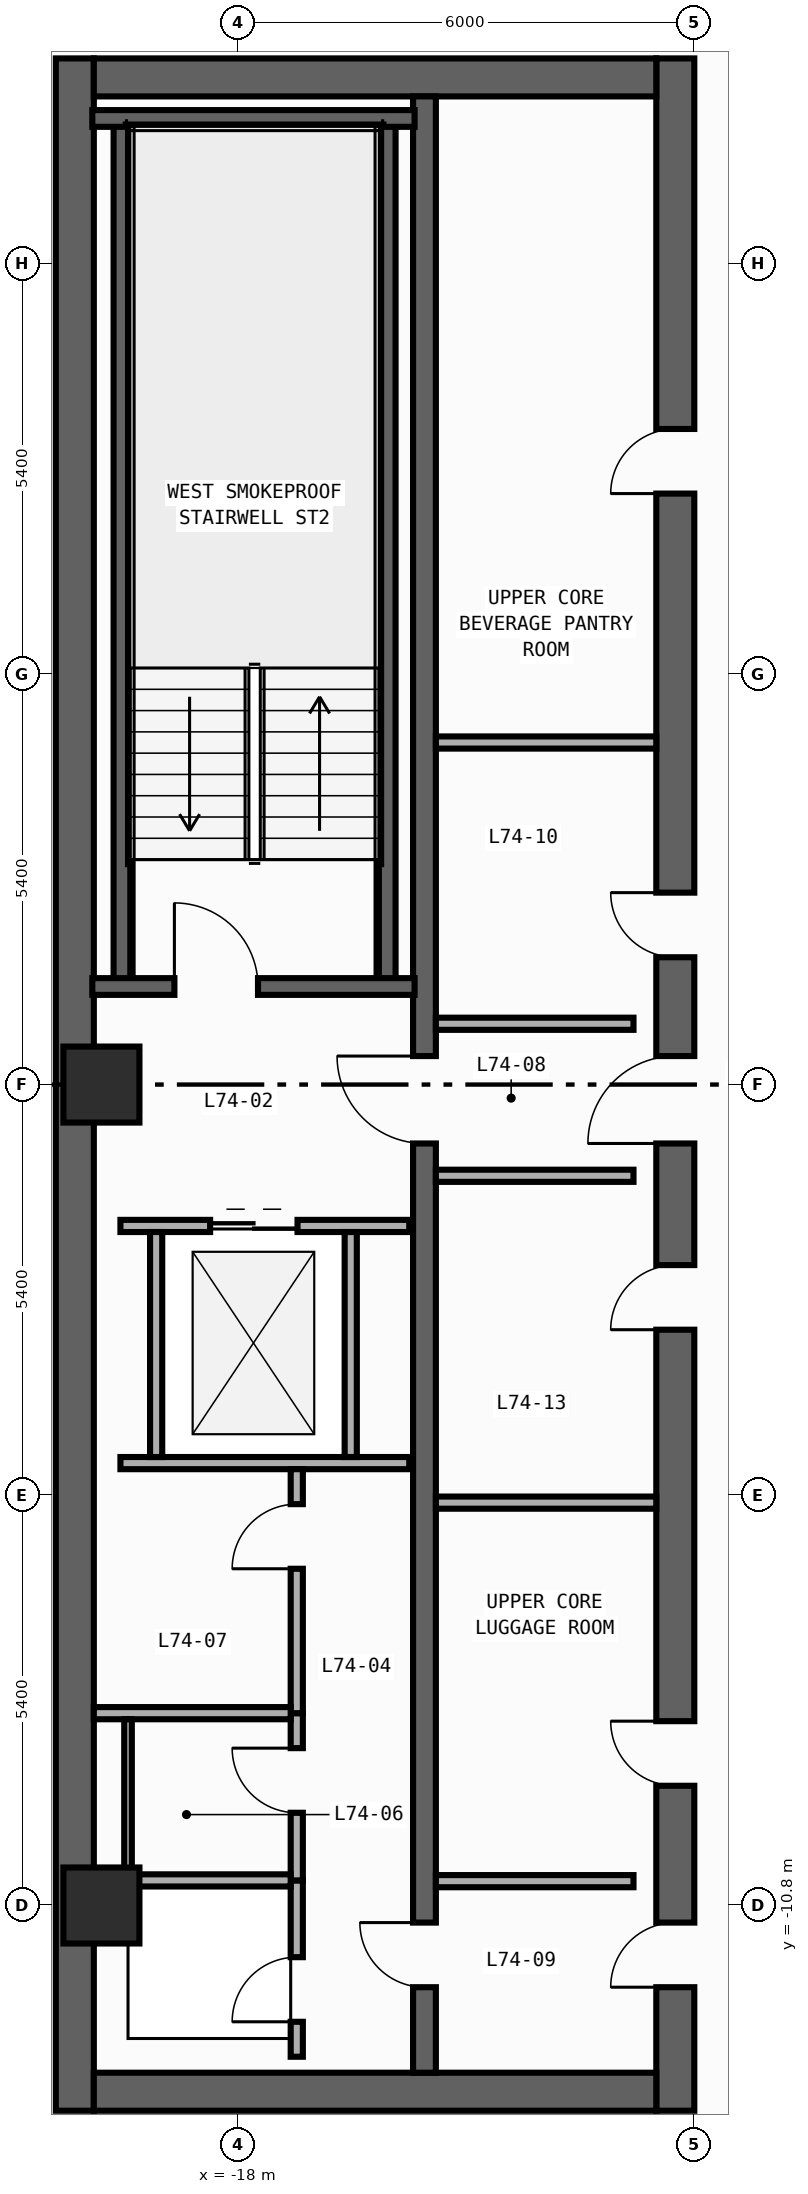
"""IFC4 building model, lengths in metres.
Left out: names, types, materials, properties, quantities, classifications, styles, units other than length and angle.
Written with IfcOpenShell. Run it as: python <this file> out.ifc"""

import sys

from ifc_helpers import new_model, si_unit, direction, frame, frame_2d, origin, origin_2d, place, context, subcontext, project, spatial, rectangle, circle, extrude, element, fill, save


model = new_model("IFC4")
c1 = context("Model", 3, precision=1e-05, world=origin(), true_north=direction((0.0, 1.0)))
c2 = subcontext(c1, "Body", "Model", "MODEL_VIEW")
j1 = project(units=[si_unit("LENGTHUNIT", "METRE"), si_unit("PLANEANGLEUNIT", "RADIAN")], contexts=[c1])
p1 = place(None, origin())
s1 = spatial("IfcSite", under=j1, at=p1, CompositionType="ELEMENT")
p2 = place(p1, origin())
s2 = spatial("IfcBuilding", under=s1, at=p2, CompositionType="ELEMENT")
p3 = place(p2, frame((0.0, 0.0, 308.0)))
s3 = spatial("IfcBuildingStorey", under=s2, at=p3, CompositionType="ELEMENT", Elevation=308.0)
p4 = place(p3, frame((-20.15, -13.5, 0.0), z_axis=(0.0, 0.0, 1.0), x_axis=(0.0, 1.0, 0.0)))
e1 = element("IfcWall", 1, at=p4, inside=s3, PredefinedType="SHEAR", context=c2, shape_type="SweptSolid", body=[
    extrude(rectangle(XDim=27.0, YDim=0.5, at=frame_2d((13.5, 0.0))), origin(), (0.0, 0.0, 1.0), 3.54),
])
p5 = place(p3, frame((-12.25, -13.5, 0.0), z_axis=(0.0, 0.0, 1.0), x_axis=(0.0, 1.0, 0.0)))
e2 = element("IfcWall", 2, at=p5, inside=s3, PredefinedType="SHEAR", context=c2, shape_type="SweptSolid", body=[
    extrude(rectangle(XDim=27.0, YDim=0.5, at=frame_2d((13.5, 0.0))), origin(), (0.0, 0.0, 1.0), 3.54),
])
p6 = place(p5, frame((15.175, 0.0, 0.0)))
e3 = element("IfcOpeningElement", 3, at=p6, cuts=e2, PredefinedType="OPENING", context=c2, shape_type="SweptSolid", body=[
    extrude(rectangle(XDim=0.85, YDim=2.1, at=frame_2d((0.425, 1.05))), frame((0.0, 0.26, 0.0), z_axis=(0.0, -1.0, 0.0), x_axis=(1.0, 0.0, 0.0)), (0.0, 0.0, 1.0), 0.52),
])
p7 = place(p5, frame((21.275, 0.0, 0.0)))
e4 = element("IfcOpeningElement", 4, at=p7, cuts=e2, PredefinedType="OPENING", context=c2, shape_type="SweptSolid", body=[
    extrude(rectangle(XDim=0.85, YDim=2.1, at=frame_2d((0.425, 1.05))), frame((0.0, 0.26, 0.0), z_axis=(0.0, -1.0, 0.0), x_axis=(1.0, 0.0, 0.0)), (0.0, 0.0, 1.0), 0.52),
])
p8 = place(p5, frame((4.275, 0.0, 0.0)))
e5 = element("IfcOpeningElement", 5, at=p8, cuts=e2, PredefinedType="OPENING", context=c2, shape_type="SweptSolid", body=[
    extrude(rectangle(XDim=0.85, YDim=2.1, at=frame_2d((0.425, 1.05))), frame((0.0, 0.26, 0.0), z_axis=(0.0, -1.0, 0.0), x_axis=(1.0, 0.0, 0.0)), (0.0, 0.0, 1.0), 0.52),
])
p9 = place(p5, frame((10.275, 0.0, 0.0)))
e6 = element("IfcOpeningElement", 6, at=p9, cuts=e2, PredefinedType="OPENING", context=c2, shape_type="SweptSolid", body=[
    extrude(rectangle(XDim=0.85, YDim=2.1, at=frame_2d((0.425, 1.05))), frame((0.0, 0.26, 0.0), z_axis=(0.0, -1.0, 0.0), x_axis=(1.0, 0.0, 0.0)), (0.0, 0.0, 1.0), 0.52),
])
p10 = place(p5, frame((12.725, 0.0, 0.0)))
e7 = element("IfcOpeningElement", 7, at=p10, cuts=e2, PredefinedType="OPENING", context=c2, shape_type="SweptSolid", body=[
    extrude(rectangle(XDim=1.15, YDim=2.2, at=frame_2d((0.575, 1.1))), frame((0.0, 0.26, 0.0), z_axis=(0.0, -1.0, 0.0), x_axis=(1.0, 0.0, 0.0)), (0.0, 0.0, 1.0), 0.52),
])
p11 = place(p5, frame((1.625, 0.0, 0.0)))
e8 = element("IfcOpeningElement", 8, at=p11, cuts=e2, PredefinedType="OPENING", context=c2, shape_type="SweptSolid", body=[
    extrude(rectangle(XDim=0.85, YDim=2.1, at=frame_2d((0.425, 1.05))), frame((0.0, 0.26, 0.0), z_axis=(0.0, -1.0, 0.0), x_axis=(1.0, 0.0, 0.0)), (0.0, 0.0, 1.0), 0.52),
])
for number, where, z_axis, x_axis in (
    (9, (-19.9, -13.25, 0.0), (0.0, 0.0, 1.0), (1.0, 0.0, 0.0)),
    (10, (-19.9, 13.25, 0.0), (0.0, 0.0, 1.0), (1.0, 0.0, 0.0)),
):
    element("IfcWall", number, at=place(p3, frame(where, z_axis=z_axis, x_axis=x_axis)), inside=s3, PredefinedType="SHEAR", context=c2, shape_type="SweptSolid", body=[
        extrude(rectangle(XDim=7.4, YDim=0.5, at=frame_2d((3.7, 0.0))), origin(), (0.0, 0.0, 1.0), 3.54),
    ])
p12 = place(p3, frame((-15.55, -13.0, 0.0), z_axis=(0.0, 0.0, 1.0), x_axis=(0.0, 1.0, 0.0)))
e11 = element("IfcWall", 11, at=p12, inside=s3, PredefinedType="SHEAR", context=c2, shape_type="SweptSolid", body=[
    extrude(rectangle(XDim=26.0, YDim=0.3, at=frame_2d((13.0, 0.0))), origin(), (0.0, 0.0, 1.0), 3.54),
])
p13 = place(p12, frame((12.225, 0.0, 0.0)))
e12 = element("IfcOpeningElement", 12, at=p13, cuts=e11, PredefinedType="OPENING", context=c2, shape_type="SweptSolid", body=[
    extrude(rectangle(XDim=1.15, YDim=2.2, at=frame_2d((0.575, 1.1))), frame((0.0, 0.16, 0.0), z_axis=(0.0, -1.0, 0.0), x_axis=(1.0, 0.0, 0.0)), (0.0, 0.0, 1.0), 0.32),
])
p14 = place(p12, frame((1.125, 0.0, 0.0)))
e13 = element("IfcOpeningElement", 13, at=p14, cuts=e11, PredefinedType="OPENING", context=c2, shape_type="SweptSolid", body=[
    extrude(rectangle(XDim=0.85, YDim=2.1, at=frame_2d((0.425, 1.05))), frame((0.0, 0.16, 0.0), z_axis=(0.0, -1.0, 0.0), x_axis=(1.0, 0.0, 0.0)), (0.0, 0.0, 1.0), 0.32),
])
for number, where, z_axis, x_axis in (
    (14, (-16.04, 1.29, 0.0), (0.0, 0.0, 1.0), (0.0, 1.0, 0.0)),
    (15, (-19.53, 1.29, 0.0), (0.0, 0.0, 1.0), (0.0, 1.0, 0.0)),
):
    element("IfcWall", number, at=place(p3, frame(where, z_axis=z_axis, x_axis=x_axis)), inside=s3, PredefinedType="SHEAR", context=c2, shape_type="SweptSolid", body=[
        extrude(rectangle(XDim=11.42, YDim=0.22, at=frame_2d((5.71, 0.0))), origin(), (0.0, 0.0, 1.0), 3.54),
    ])
p15 = place(p3, frame((-19.92, 12.71, 0.0), z_axis=(0.0, 0.0, 1.0), x_axis=(1.0, 0.0, 0.0)))
e16 = element("IfcWall", 16, at=p15, inside=s3, PredefinedType="SHEAR", context=c2, shape_type="SweptSolid", body=[
    extrude(rectangle(XDim=4.24, YDim=0.22, at=frame_2d((2.12, 0.0))), origin(), (0.0, 0.0, 1.0), 3.54),
])
p16 = place(p3, frame((-19.92, 1.29, 0.0), z_axis=(0.0, 0.0, 1.0), x_axis=(1.0, 0.0, 0.0)))
e17 = element("IfcWall", 17, at=p16, inside=s3, PredefinedType="SHEAR", context=c2, shape_type="SweptSolid", body=[
    extrude(rectangle(XDim=4.24, YDim=0.22, at=frame_2d((2.12, 0.0))), origin(), (0.0, 0.0, 1.0), 3.54),
])
p17 = place(p16, frame((1.08, 0.0, 0.0)))
e18 = element("IfcOpeningElement", 18, at=p17, cuts=e17, PredefinedType="OPENING", context=c2, shape_type="SweptSolid", body=[
    extrude(rectangle(XDim=1.1, YDim=2.2, at=frame_2d((0.55, 1.1))), frame((0.0, 0.12, 0.0), z_axis=(0.0, -1.0, 0.0), x_axis=(1.0, 0.0, 0.0)), (0.0, 0.0, 1.0), 0.24),
])
for number, where, z_axis, x_axis in (
    (19, (-19.8, -10.8, 0.0), (0.0, 0.0, 1.0), (1.0, 0.0, 0.0)),
    (20, (-19.8, 0.0, 0.0), (0.0, 0.0, 1.0), (1.0, 0.0, 0.0)),
):
    element("IfcColumn", number, at=place(p3, frame(where, z_axis=z_axis, x_axis=x_axis)), inside=s3, PredefinedType="COLUMN", context=c2, shape_type="SweptSolid", body=[
        extrude(circle(Radius=0.5, at=origin_2d()), origin(), (0.0, 0.0, 1.0), 3.8),
    ])
p18 = place(p3, frame((-19.55, -1.86, 0.0), z_axis=(0.0, 0.0, 1.0), x_axis=(1.0, 0.0, 0.0)))
e21 = element("IfcWall", 21, at=p18, inside=s3, PredefinedType="STANDARD", context=c2, shape_type="SweptSolid", body=[
    extrude(rectangle(XDim=3.8, YDim=0.16, at=frame_2d((1.9, 0.0))), origin(), (0.0, 0.0, 1.0), 3.54),
])
p19 = place(p18, frame((1.18, 0.0, 0.0)))
e22 = element("IfcOpeningElement", 22, at=p19, cuts=e21, PredefinedType="OPENING", context=c2, shape_type="SweptSolid", body=[
    extrude(rectangle(XDim=1.15, YDim=2.2, at=frame_2d((0.575, 1.1))), frame((0.0, 0.09, 0.0), z_axis=(0.0, -1.0, 0.0), x_axis=(1.0, 0.0, 0.0)), (0.0, 0.0, 1.0), 0.18),
])
p20 = place(p3, frame((-19.55, -4.98, 0.0), z_axis=(0.0, 0.0, 1.0), x_axis=(1.0, 0.0, 0.0)))
e23 = element("IfcWall", 23, at=p20, inside=s3, PredefinedType="STANDARD", context=c2, shape_type="SweptSolid", body=[
    extrude(rectangle(XDim=3.8, YDim=0.16, at=frame_2d((1.9, 0.0))), origin(), (0.0, 0.0, 1.0), 3.54),
])
for number, where, z_axis, x_axis in (
    (24, (-19.08, -4.9, 0.0), (0.0, 0.0, 1.0), (0.0, 1.0, 0.0)),
    (25, (-16.52, -4.9, 0.0), (0.0, 0.0, 1.0), (0.0, 1.0, 0.0)),
):
    element("IfcWall", number, at=place(p3, frame(where, z_axis=z_axis, x_axis=x_axis)), inside=s3, PredefinedType="STANDARD", context=c2, shape_type="SweptSolid", body=[
        extrude(rectangle(XDim=2.96, YDim=0.16, at=frame_2d((1.48, 0.0))), origin(), (0.0, 0.0, 1.0), 3.54),
    ])
for number, where, z_axis, x_axis in (
    (26, (-15.4, 0.8, 0.0), (0.0, 0.0, 1.0), (1.0, 0.0, 0.0)),
    (27, (-15.4, -1.2, 0.0), (0.0, 0.0, 1.0), (1.0, 0.0, 0.0)),
    (28, (-15.4, -10.48, 0.0), (0.0, 0.0, 1.0), (1.0, 0.0, 0.0)),
):
    element("IfcWall", number, at=place(p3, frame(where, z_axis=z_axis, x_axis=x_axis)), inside=s3, PredefinedType="STANDARD", context=c2, shape_type="SweptSolid", body=[
        extrude(rectangle(XDim=2.6, YDim=0.16, at=frame_2d((1.3, 0.0))), origin(), (0.0, 0.0, 1.0), 3.54),
    ])
p21 = place(p3, frame((-17.23, -12.79, 0.0), z_axis=(0.0, 0.0, 1.0), x_axis=(0.0, 1.0, 0.0)))
e29 = element("IfcWall", 29, at=p21, inside=s3, PredefinedType="PARTITIONING", context=c2, shape_type="SweptSolid", body=[
    extrude(rectangle(XDim=2.32, YDim=0.16, at=frame_2d((1.16, 0.0))), origin(), (0.0, 0.0, 1.0), 3.54),
])
p22 = place(p21, frame((0.46, 0.0, 0.0)))
e30 = element("IfcOpeningElement", 30, at=p22, cuts=e29, PredefinedType="OPENING", context=c2, shape_type="SweptSolid", body=[
    extrude(rectangle(XDim=0.85, YDim=2.1, at=frame_2d((0.425, 1.05))), frame((0.0, 0.09, 0.0), z_axis=(0.0, -1.0, 0.0), x_axis=(1.0, 0.0, 0.0)), (0.0, 0.0, 1.0), 0.18),
])
p23 = place(p3, frame((-17.23, -10.47, 0.0), z_axis=(0.0, 0.0, 1.0), x_axis=(0.0, 1.0, 0.0)))
e31 = element("IfcWall", 31, at=p23, inside=s3, PredefinedType="PARTITIONING", context=c2, shape_type="SweptSolid", body=[
    extrude(rectangle(XDim=2.2, YDim=0.16, at=frame_2d((1.1, 0.0))), origin(), (0.0, 0.0, 1.0), 3.54),
])
p24 = place(p23, frame((0.89, 0.0, 0.0)))
e32 = element("IfcOpeningElement", 32, at=p24, cuts=e31, PredefinedType="OPENING", context=c2, shape_type="SweptSolid", body=[
    extrude(rectangle(XDim=0.85, YDim=2.1, at=frame_2d((0.425, 1.05))), frame((0.0, 0.09, 0.0), z_axis=(0.0, -1.0, 0.0), x_axis=(1.0, 0.0, 0.0)), (0.0, 0.0, 1.0), 0.18),
])
p25 = place(p3, frame((-17.23, -8.27, 0.0), z_axis=(0.0, 0.0, 1.0), x_axis=(0.0, 1.0, 0.0)))
e33 = element("IfcWall", 33, at=p25, inside=s3, PredefinedType="PARTITIONING", context=c2, shape_type="SweptSolid", body=[
    extrude(rectangle(XDim=3.21, YDim=0.16, at=frame_2d((1.605, 0.0))), origin(), (0.0, 0.0, 1.0), 3.54),
])
p26 = place(p25, frame((1.9, 0.0, 0.0)))
e34 = element("IfcOpeningElement", 34, at=p26, cuts=e33, PredefinedType="OPENING", context=c2, shape_type="SweptSolid", body=[
    extrude(rectangle(XDim=0.85, YDim=2.1, at=frame_2d((0.425, 1.05))), frame((0.0, 0.09, 0.0), z_axis=(0.0, -1.0, 0.0), x_axis=(1.0, 0.0, 0.0)), (0.0, 0.0, 1.0), 0.18),
])
p27 = place(p3, frame((-19.75, -10.47, 0.0), z_axis=(0.0, 0.0, 1.0), x_axis=(1.0, 0.0, 0.0)))
e35 = element("IfcWall", 35, at=p27, inside=s3, PredefinedType="PARTITIONING", context=c2, shape_type="SweptSolid", body=[
    extrude(rectangle(XDim=2.44, YDim=0.16, at=frame_2d((1.22, 0.0))), origin(), (0.0, 0.0, 1.0), 3.54),
])
p28 = place(p3, frame((-19.9, -8.27, 0.0), z_axis=(0.0, 0.0, 1.0), x_axis=(1.0, 0.0, 0.0)))
e36 = element("IfcWall", 36, at=p28, inside=s3, PredefinedType="PARTITIONING", context=c2, shape_type="SweptSolid", body=[
    extrude(rectangle(XDim=2.59, YDim=0.16, at=frame_2d((1.295, 0.0))), origin(), (0.0, 0.0, 1.0), 3.54),
])
for number, where, z_axis, x_axis in (
    (37, (-15.4, 4.5, 0.0), (0.0, 0.0, 1.0), (1.0, 0.0, 0.0)),
    (38, (-15.4, -5.5, 0.0), (0.0, 0.0, 1.0), (1.0, 0.0, 0.0)),
):
    element("IfcWall", number, at=place(p3, frame(where, z_axis=z_axis, x_axis=x_axis)), inside=s3, PredefinedType="PARTITIONING", context=c2, shape_type="SweptSolid", body=[
        extrude(rectangle(XDim=2.9, YDim=0.16, at=frame_2d((1.45, 0.0))), origin(), (0.0, 0.0, 1.0), 3.54),
    ])
p29 = place(p3, frame((-19.45, -10.39, 0.0), z_axis=(0.0, 0.0, 1.0), x_axis=(0.0, 1.0, 0.0)))
e39 = element("IfcWall", 39, at=p29, inside=s3, PredefinedType="PARTITIONING", context=c2, shape_type="SweptSolid", body=[
    extrude(rectangle(XDim=2.04, YDim=0.1, at=frame_2d((1.02, 0.0))), origin(), (0.0, 0.0, 1.0), 3.54),
])
p30 = place(p17, origin())
e40 = element("IfcDoor", 40, at=p30, inside=s3, OperationType="SINGLE_SWING_LEFT", PredefinedType="DOOR", context=c2, shape_type="SweptSolid", body=[
    extrude(rectangle(XDim=1.1, YDim=2.2, at=frame_2d((0.55, 1.1))), frame((0.0, 0.025, 0.0), z_axis=(0.0, -1.0, 0.0), x_axis=(1.0, 0.0, 0.0)), (0.0, 0.0, 1.0), 0.05),
])
fill(e18, e40)
p31 = place(p6, origin())
e41 = element("IfcDoor", 41, at=p31, inside=s3, OperationType="SINGLE_SWING_RIGHT", PredefinedType="DOOR", context=c2, shape_type="SweptSolid", body=[
    extrude(rectangle(XDim=0.85, YDim=2.1, at=frame_2d((0.425, 1.05))), frame((0.0, 0.025, 0.0), z_axis=(0.0, -1.0, 0.0), x_axis=(1.0, 0.0, 0.0)), (0.0, 0.0, 1.0), 0.05),
])
fill(e3, e41)
p32 = place(p7, origin())
e42 = element("IfcDoor", 42, at=p32, inside=s3, OperationType="SINGLE_SWING_LEFT", PredefinedType="DOOR", context=c2, shape_type="SweptSolid", body=[
    extrude(rectangle(XDim=0.85, YDim=2.1, at=frame_2d((0.425, 1.05))), frame((0.0, 0.025, 0.0), z_axis=(0.0, -1.0, 0.0), x_axis=(1.0, 0.0, 0.0)), (0.0, 0.0, 1.0), 0.05),
])
fill(e4, e42)
p33 = place(p8, origin())
e43 = element("IfcDoor", 43, at=p33, inside=s3, OperationType="SINGLE_SWING_RIGHT", PredefinedType="DOOR", context=c2, shape_type="SweptSolid", body=[
    extrude(rectangle(XDim=0.85, YDim=2.1, at=frame_2d((0.425, 1.05))), frame((0.0, 0.025, 0.0), z_axis=(0.0, -1.0, 0.0), x_axis=(1.0, 0.0, 0.0)), (0.0, 0.0, 1.0), 0.05),
])
fill(e5, e43)
p34 = place(p9, origin())
e44 = element("IfcDoor", 44, at=p34, inside=s3, OperationType="SINGLE_SWING_LEFT", PredefinedType="DOOR", context=c2, shape_type="SweptSolid", body=[
    extrude(rectangle(XDim=0.85, YDim=2.1, at=frame_2d((0.425, 1.05))), frame((0.0, 0.025, 0.0), z_axis=(0.0, -1.0, 0.0), x_axis=(1.0, 0.0, 0.0)), (0.0, 0.0, 1.0), 0.05),
])
fill(e6, e44)
p35 = place(p10, origin())
e45 = element("IfcDoor", 45, at=p35, inside=s3, OperationType="SINGLE_SWING_LEFT", PredefinedType="DOOR", context=c2, shape_type="SweptSolid", body=[
    extrude(rectangle(XDim=1.15, YDim=2.2, at=frame_2d((0.575, 1.1))), frame((0.0, 0.025, 0.0), z_axis=(0.0, -1.0, 0.0), x_axis=(1.0, 0.0, 0.0)), (0.0, 0.0, 1.0), 0.05),
])
fill(e7, e45)
p36 = place(p13, origin())
e46 = element("IfcDoor", 46, at=p36, inside=s3, OperationType="SINGLE_SWING_RIGHT", PredefinedType="DOOR", context=c2, shape_type="SweptSolid", body=[
    extrude(rectangle(XDim=1.15, YDim=2.2, at=frame_2d((0.575, 1.1))), frame((0.0, 0.025, 0.0), z_axis=(0.0, -1.0, 0.0), x_axis=(1.0, 0.0, 0.0)), (0.0, 0.0, 1.0), 0.05),
])
fill(e12, e46)
p37 = place(p11, origin())
e47 = element("IfcDoor", 47, at=p37, inside=s3, OperationType="SINGLE_SWING_LEFT", PredefinedType="DOOR", context=c2, shape_type="SweptSolid", body=[
    extrude(rectangle(XDim=0.85, YDim=2.1, at=frame_2d((0.425, 1.05))), frame((0.0, 0.025, 0.0), z_axis=(0.0, -1.0, 0.0), x_axis=(1.0, 0.0, 0.0)), (0.0, 0.0, 1.0), 0.05),
])
fill(e8, e47)
p38 = place(p14, origin())
e48 = element("IfcDoor", 48, at=p38, inside=s3, OperationType="SINGLE_SWING_RIGHT", PredefinedType="DOOR", context=c2, shape_type="SweptSolid", body=[
    extrude(rectangle(XDim=0.85, YDim=2.1, at=frame_2d((0.425, 1.05))), frame((0.0, 0.025, 0.0), z_axis=(0.0, -1.0, 0.0), x_axis=(1.0, 0.0, 0.0)), (0.0, 0.0, 1.0), 0.05),
])
fill(e13, e48)
p39 = place(p19, origin())
e49 = element("IfcDoor", 49, at=p39, inside=s3, OperationType="DOUBLE_DOOR_SLIDING", PredefinedType="DOOR", context=c2, shape_type="SweptSolid", body=[
    extrude(rectangle(XDim=1.15, YDim=2.2, at=frame_2d((0.575, 1.1))), frame((0.0, 0.025, 0.0), z_axis=(0.0, -1.0, 0.0), x_axis=(1.0, 0.0, 0.0)), (0.0, 0.0, 1.0), 0.05),
])
fill(e22, e49)
p40 = place(p22, origin())
e50 = element("IfcDoor", 50, at=p40, inside=s3, OperationType="SINGLE_SWING_LEFT", PredefinedType="DOOR", context=c2, shape_type="SweptSolid", body=[
    extrude(rectangle(XDim=0.85, YDim=2.1, at=frame_2d((0.425, 1.05))), frame((0.0, 0.025, 0.0), z_axis=(0.0, -1.0, 0.0), x_axis=(1.0, 0.0, 0.0)), (0.0, 0.0, 1.0), 0.05),
])
fill(e30, e50)
p41 = place(p24, origin())
e51 = element("IfcDoor", 51, at=p41, inside=s3, OperationType="SINGLE_SWING_RIGHT", PredefinedType="DOOR", context=c2, shape_type="SweptSolid", body=[
    extrude(rectangle(XDim=0.85, YDim=2.1, at=frame_2d((0.425, 1.05))), frame((0.0, 0.025, 0.0), z_axis=(0.0, -1.0, 0.0), x_axis=(1.0, 0.0, 0.0)), (0.0, 0.0, 1.0), 0.05),
])
fill(e32, e51)
p42 = place(p26, origin())
e52 = element("IfcDoor", 52, at=p42, inside=s3, OperationType="SINGLE_SWING_LEFT", PredefinedType="DOOR", context=c2, shape_type="SweptSolid", body=[
    extrude(rectangle(XDim=0.85, YDim=2.1, at=frame_2d((0.425, 1.05))), frame((0.0, 0.025, 0.0), z_axis=(0.0, -1.0, 0.0), x_axis=(1.0, 0.0, 0.0)), (0.0, 0.0, 1.0), 0.05),
])
fill(e34, e52)
save(model, sys.argv[1])
